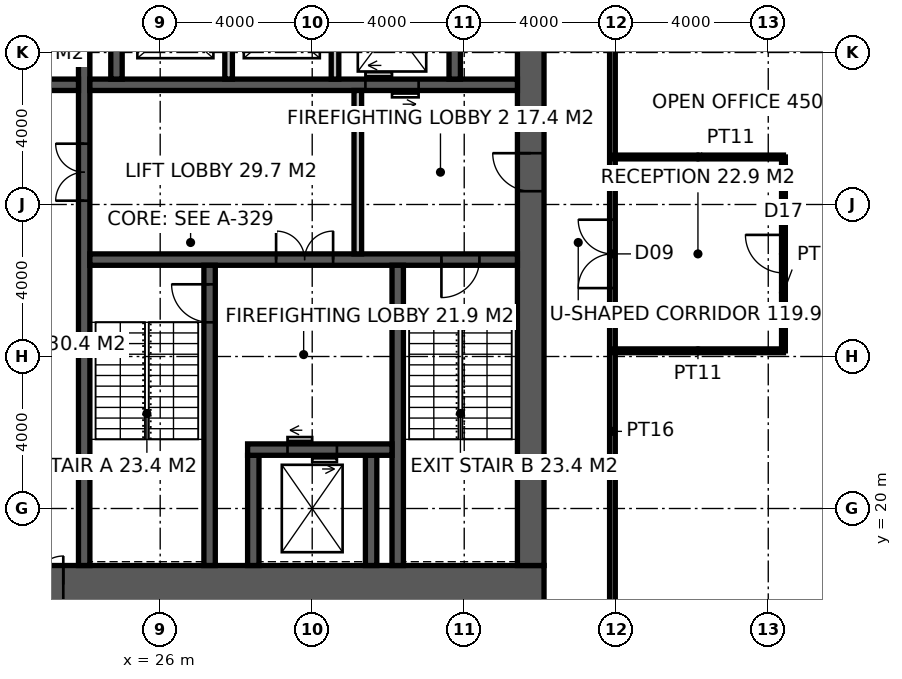
"""IFC4 building model, lengths in metres.
Left out: names, types, materials, properties, quantities, classifications, styles, units other than length and angle.
Written with IfcOpenShell. Run it as: python <this file> out.ifc"""

import sys

from ifc_helpers import new_model, si_unit, direction, frame, frame_2d, origin, place, context, subcontext, project, spatial, rectangle, extrude, element, fill, save


model = new_model("IFC4")
c1 = context("Model", 3, precision=1e-05, world=origin(), true_north=direction((0.0, 1.0)))
c2 = subcontext(c1, "Body", "Model", "MODEL_VIEW")
j1 = project(units=[si_unit("LENGTHUNIT", "METRE"), si_unit("PLANEANGLEUNIT", "RADIAN")], contexts=[c1])
p1 = place(None, origin())
s1 = spatial("IfcSite", under=j1, at=p1, CompositionType="ELEMENT")
p2 = place(p1, origin())
s2 = spatial("IfcBuilding", under=s1, at=p2, CompositionType="ELEMENT")
p3 = place(p2, frame((0.0, 0.0, 159.8)))
s3 = spatial("IfcBuildingStorey", under=s2, at=p3, CompositionType="ELEMENT", Elevation=159.8)
p4 = place(p3, frame((18.5, 18.0, -0.15), z_axis=(0.0, 0.0, 1.0), x_axis=(1.0, 0.0, 0.0)))
e1 = element("IfcWall", 1, at=p4, inside=s3, PredefinedType="SHEAR", context=c2, shape_type="SweptSolid", body=[
    extrude(rectangle(XDim=17.6, YDim=1.0, at=frame_2d((8.8, 0.0))), origin(), (0.0, 0.0, 1.0), 4.0),
])
p5 = place(p4, frame((3.45, 0.0, 0.15)))
e2 = element("IfcOpeningElement", 2, at=p5, cuts=e1, PredefinedType="OPENING", context=c2, shape_type="SweptSolid", body=[
    extrude(rectangle(XDim=1.5, YDim=2.4, at=frame_2d((0.75, 1.2))), frame((0.0, 0.51, 0.0), z_axis=(0.0, -1.0, 0.0), x_axis=(1.0, 0.0, 0.0)), (0.0, 0.0, 1.0), 1.02),
])
p6 = place(p3, frame((35.75, 18.5, -0.15), z_axis=(0.0, 0.0, 1.0), x_axis=(0.0, 1.0, 0.0)))
e3 = element("IfcWall", 3, at=p6, inside=s3, PredefinedType="SHEAR", context=c2, shape_type="SweptSolid", body=[
    extrude(rectangle(XDim=17.0, YDim=0.7, at=frame_2d((8.5, 0.0))), origin(), (0.0, 0.0, 1.0), 4.0),
])
p7 = place(p6, frame((9.85, 0.0, 0.15)))
e4 = element("IfcOpeningElement", 4, at=p7, cuts=e3, PredefinedType="OPENING", context=c2, shape_type="SweptSolid", body=[
    extrude(rectangle(XDim=1.0, YDim=2.2, at=frame_2d((0.5, 1.1))), frame((0.0, 0.36, 0.0), z_axis=(0.0, -1.0, 0.0), x_axis=(1.0, 0.0, 0.0)), (0.0, 0.0, 1.0), 0.72),
])
p8 = place(p3, frame((24.0, 18.5, -0.15), z_axis=(0.0, 0.0, 1.0), x_axis=(0.0, 1.0, 0.0)))
e5 = element("IfcWall", 5, at=p8, inside=s3, PredefinedType="SHEAR", context=c2, shape_type="SweptSolid", body=[
    extrude(rectangle(XDim=17.0, YDim=0.3, at=frame_2d((8.5, 0.0))), origin(), (0.0, 0.0, 1.0), 4.0),
])
p9 = place(p8, frame((9.6, 0.0, 0.15)))
e6 = element("IfcOpeningElement", 6, at=p9, cuts=e5, PredefinedType="OPENING", context=c2, shape_type="SweptSolid", body=[
    extrude(rectangle(XDim=1.5, YDim=2.4, at=frame_2d((0.75, 1.2))), frame((0.0, 0.16, 0.0), z_axis=(0.0, -1.0, 0.0), x_axis=(1.0, 0.0, 0.0)), (0.0, 0.0, 1.0), 0.32),
])
p10 = place(p3, frame((24.15, 26.55, -0.15), z_axis=(0.0, 0.0, 1.0), x_axis=(1.0, 0.0, 0.0)))
e7 = element("IfcWall", 7, at=p10, inside=s3, PredefinedType="SHEAR", context=c2, shape_type="SweptSolid", body=[
    extrude(rectangle(XDim=11.25, YDim=0.3, at=frame_2d((5.625, 0.0))), origin(), (0.0, 0.0, 1.0), 4.0),
])
p11 = place(p10, frame((9.25, 0.0, 0.15)))
e8 = element("IfcOpeningElement", 8, at=p11, cuts=e7, PredefinedType="OPENING", context=c2, shape_type="SweptSolid", body=[
    extrude(rectangle(XDim=1.0, YDim=2.2, at=frame_2d((0.5, 1.1))), frame((0.0, 0.16, 0.0), z_axis=(0.0, -1.0, 0.0), x_axis=(1.0, 0.0, 0.0)), (0.0, 0.0, 1.0), 0.32),
])
p12 = place(p10, frame((4.9, 0.0, 0.15)))
e9 = element("IfcOpeningElement", 9, at=p12, cuts=e7, PredefinedType="OPENING", context=c2, shape_type="SweptSolid", body=[
    extrude(rectangle(XDim=1.5, YDim=2.4, at=frame_2d((0.75, 1.2))), frame((0.0, 0.16, 0.0), z_axis=(0.0, -1.0, 0.0), x_axis=(1.0, 0.0, 0.0)), (0.0, 0.0, 1.0), 0.32),
])
p13 = place(p3, frame((27.3, 18.5, -0.15), z_axis=(0.0, 0.0, 1.0), x_axis=(0.0, 1.0, 0.0)))
e10 = element("IfcWall", 10, at=p13, inside=s3, PredefinedType="SHEAR", context=c2, shape_type="SweptSolid", body=[
    extrude(rectangle(XDim=7.9, YDim=0.3, at=frame_2d((3.95, 0.0))), origin(), (0.0, 0.0, 1.0), 4.0),
])
p14 = place(p13, frame((6.4, 0.0, 0.15)))
e11 = element("IfcOpeningElement", 11, at=p14, cuts=e10, PredefinedType="OPENING", context=c2, shape_type="SweptSolid", body=[
    extrude(rectangle(XDim=1.0, YDim=2.2, at=frame_2d((0.5, 1.1))), frame((0.0, 0.16, 0.0), z_axis=(0.0, -1.0, 0.0), x_axis=(1.0, 0.0, 0.0)), (0.0, 0.0, 1.0), 0.32),
])
p15 = place(p3, frame((32.25, 18.5, -0.15), z_axis=(0.0, 0.0, 1.0), x_axis=(0.0, 1.0, 0.0)))
e12 = element("IfcWall", 12, at=p15, inside=s3, PredefinedType="SHEAR", context=c2, shape_type="SweptSolid", body=[
    extrude(rectangle(XDim=7.9, YDim=0.3, at=frame_2d((3.95, 0.0))), origin(), (0.0, 0.0, 1.0), 4.0),
])
for number, where, z_axis, x_axis in (
    (13, (28.45, 18.5, -0.15), (0.0, 0.0, 1.0), (0.0, 1.0, 0.0)),
    (14, (31.55, 18.5, -0.15), (0.0, 0.0, 1.0), (0.0, 1.0, 0.0)),
):
    element("IfcWall", number, at=place(p3, frame(where, z_axis=z_axis, x_axis=x_axis)), inside=s3, PredefinedType="SHEAR", context=c2, shape_type="SweptSolid", body=[
        extrude(rectangle(XDim=2.9, YDim=0.3, at=frame_2d((1.45, 0.0))), origin(), (0.0, 0.0, 1.0), 4.0),
    ])
p16 = place(p3, frame((28.3, 21.55, -0.15), z_axis=(0.0, 0.0, 1.0), x_axis=(1.0, 0.0, 0.0)))
e15 = element("IfcWall", 15, at=p16, inside=s3, PredefinedType="SHEAR", context=c2, shape_type="SweptSolid", body=[
    extrude(rectangle(XDim=3.8, YDim=0.3, at=frame_2d((1.9, 0.0))), origin(), (0.0, 0.0, 1.0), 4.0),
])
p17 = place(p16, frame((1.05, 0.0, 0.15)))
e16 = element("IfcOpeningElement", 16, at=p17, cuts=e15, PredefinedType="OPENING", context=c2, shape_type="SweptSolid", body=[
    extrude(rectangle(XDim=1.3, YDim=2.4, at=frame_2d((0.65, 1.2))), frame((0.0, 0.16, 0.0), z_axis=(0.0, -1.0, 0.0), x_axis=(1.0, 0.0, 0.0)), (0.0, 0.0, 1.0), 0.32),
])
p18 = place(p3, frame((24.15, 31.15, -0.15), z_axis=(0.0, 0.0, 1.0), x_axis=(1.0, 0.0, 0.0)))
e17 = element("IfcWall", 17, at=p18, inside=s3, PredefinedType="SHEAR", context=c2, shape_type="SweptSolid", body=[
    extrude(rectangle(XDim=11.25, YDim=0.3, at=frame_2d((5.625, 0.0))), origin(), (0.0, 0.0, 1.0), 4.0),
])
p19 = place(p18, frame((7.25, 0.0, 0.15)))
e18 = element("IfcOpeningElement", 18, at=p19, cuts=e17, PredefinedType="OPENING", context=c2, shape_type="SweptSolid", body=[
    extrude(rectangle(XDim=1.4, YDim=2.4, at=frame_2d((0.7, 1.2))), frame((0.0, 0.16, 0.0), z_axis=(0.0, -1.0, 0.0), x_axis=(1.0, 0.0, 0.0)), (0.0, 0.0, 1.0), 0.32),
])
p20 = place(p3, frame((18.5, 31.15, -0.15), z_axis=(0.0, 0.0, 1.0), x_axis=(1.0, 0.0, 0.0)))
e19 = element("IfcWall", 19, at=p20, inside=s3, PredefinedType="SHEAR", context=c2, shape_type="SweptSolid", body=[
    extrude(rectangle(XDim=5.35, YDim=0.3, at=frame_2d((2.675, 0.0))), origin(), (0.0, 0.0, 1.0), 4.0),
])
p21 = place(p20, frame((3.4, 0.0, 0.15)))
e20 = element("IfcOpeningElement", 20, at=p21, cuts=e19, PredefinedType="OPENING", context=c2, shape_type="SweptSolid", body=[
    extrude(rectangle(XDim=1.0, YDim=2.2, at=frame_2d((0.5, 1.1))), frame((0.0, 0.16, 0.0), z_axis=(0.0, -1.0, 0.0), x_axis=(1.0, 0.0, 0.0)), (0.0, 0.0, 1.0), 0.32),
])
for number, where, z_axis, x_axis in (
    (21, (24.85, 31.3, -0.15), (0.0, 0.0, 1.0), (0.0, 1.0, 0.0)),
    (22, (33.75, 31.3, -0.15), (0.0, 0.0, 1.0), (0.0, 1.0, 0.0)),
):
    element("IfcWall", number, at=place(p3, frame(where, z_axis=z_axis, x_axis=x_axis)), inside=s3, PredefinedType="SHEAR", context=c2, shape_type="SweptSolid", body=[
        extrude(rectangle(XDim=4.2, YDim=0.3, at=frame_2d((2.1, 0.0))), origin(), (0.0, 0.0, 1.0), 4.0),
    ])
for number, where, z_axis, x_axis in (
    (23, (27.8, 31.3, -0.15), (0.0, 0.0, 1.0), (0.0, 1.0, 0.0)),
    (24, (30.6, 31.3, -0.15), (0.0, 0.0, 1.0), (0.0, 1.0, 0.0)),
):
    element("IfcWall", number, at=place(p3, frame(where, z_axis=z_axis, x_axis=x_axis)), inside=s3, PredefinedType="SOLIDWALL", context=c2, shape_type="SweptSolid", body=[
        extrude(rectangle(XDim=2.8, YDim=0.2, at=frame_2d((1.4, 0.0))), origin(), (0.0, 0.0, 1.0), 4.0),
    ])
p22 = place(p3, frame((31.2, 26.7, 0.0), z_axis=(0.0, 0.0, 1.0), x_axis=(0.0, 1.0, 0.0)))
e25 = element("IfcWall", 25, at=p22, inside=s3, PredefinedType="SOLIDWALL", context=c2, shape_type="SweptSolid", body=[
    extrude(rectangle(XDim=4.3, YDim=0.2, at=frame_2d((2.15, 0.0))), origin(), (0.0, 0.0, 1.0), 3.85),
])
p23 = place(p3, frame((37.9, 15.025, 0.0), z_axis=(0.0, 0.0, 1.0), x_axis=(0.0, 1.0, 0.0)))
e26 = element("IfcWall", 26, at=p23, inside=s3, PredefinedType="PARTITIONING", context=c2, shape_type="SweptSolid", body=[
    extrude(rectangle(XDim=23.35, YDim=0.15, at=frame_2d((11.675, 0.0))), origin(), (0.0, 0.0, 1.0), 2.95),
])
p24 = place(p23, frame((10.775, 0.0, 0.0)))
e27 = element("IfcOpeningElement", 27, at=p24, cuts=e26, PredefinedType="OPENING", context=c2, shape_type="SweptSolid", body=[
    extrude(rectangle(XDim=1.8, YDim=2.4, at=frame_2d((0.9, 1.2))), frame((0.0, 0.085, 0.0), z_axis=(0.0, -1.0, 0.0), x_axis=(1.0, 0.0, 0.0)), (0.0, 0.0, 1.0), 0.17),
])
p25 = place(p3, frame((37.9, 24.15, 0.0), z_axis=(0.0, 0.0, 1.0), x_axis=(1.0, 0.0, 0.0)))
e28 = element("IfcWall", 28, at=p25, inside=s3, PredefinedType="PARTITIONING", context=c2, shape_type="SweptSolid", body=[
    extrude(rectangle(XDim=4.5, YDim=0.1, at=frame_2d((2.25, 0.0))), origin(), (0.0, 0.0, 1.0), 2.95),
])
p26 = place(p3, frame((42.4, 24.15, 0.0), z_axis=(0.0, 0.0, 1.0), x_axis=(0.0, 1.0, 0.0)))
e29 = element("IfcWall", 29, at=p26, inside=s3, PredefinedType="PARTITIONING", context=c2, shape_type="SweptSolid", body=[
    extrude(rectangle(XDim=5.1, YDim=0.1, at=frame_2d((2.55, 0.0))), origin(), (0.0, 0.0, 1.0), 3.85),
])
p27 = place(p26, frame((2.05, 0.0, 0.0)))
e30 = element("IfcOpeningElement", 30, at=p27, cuts=e29, PredefinedType="OPENING", context=c2, shape_type="SweptSolid", body=[
    extrude(rectangle(XDim=1.0, YDim=2.2, at=frame_2d((0.5, 1.1))), frame((0.0, 0.06, 0.0), z_axis=(0.0, -1.0, 0.0), x_axis=(1.0, 0.0, 0.0)), (0.0, 0.0, 1.0), 0.12),
])
p28 = place(p3, frame((42.4, 29.25, 0.0), z_axis=(0.0, 0.0, 1.0), x_axis=(-1.0, 0.0, 0.0)))
e31 = element("IfcWall", 31, at=p28, inside=s3, PredefinedType="PARTITIONING", context=c2, shape_type="SweptSolid", body=[
    extrude(rectangle(XDim=4.5, YDim=0.1, at=frame_2d((2.25, 0.0))), origin(), (0.0, 0.0, 1.0), 3.85),
])
p29 = place(p14, origin())
e32 = element("IfcDoor", 32, at=p29, inside=s3, OperationType="SINGLE_SWING_RIGHT", PredefinedType="DOOR", context=c2, shape_type="SweptSolid", body=[
    extrude(rectangle(XDim=1.0, YDim=2.2, at=frame_2d((0.5, 1.1))), frame((0.0, 0.025, 0.0), z_axis=(0.0, -1.0, 0.0), x_axis=(1.0, 0.0, 0.0)), (0.0, 0.0, 1.0), 0.05),
])
fill(e11, e32)
p30 = place(p11, frame((1.0, 0.0, 0.0), z_axis=(0.0, 0.0, 1.0), x_axis=(-1.0, 0.0, 0.0)))
e33 = element("IfcDoor", 33, at=p30, inside=s3, OperationType="SINGLE_SWING_RIGHT", PredefinedType="DOOR", context=c2, shape_type="SweptSolid", body=[
    extrude(rectangle(XDim=1.0, YDim=2.2, at=frame_2d((0.5, 1.1))), frame((0.0, 0.025, 0.0), z_axis=(0.0, -1.0, 0.0), x_axis=(1.0, 0.0, 0.0)), (0.0, 0.0, 1.0), 0.05),
])
fill(e8, e33)
p31 = place(p7, origin())
e34 = element("IfcDoor", 34, at=p31, inside=s3, OperationType="SINGLE_SWING_RIGHT", PredefinedType="DOOR", context=c2, shape_type="SweptSolid", body=[
    extrude(rectangle(XDim=1.0, YDim=2.2, at=frame_2d((0.5, 1.1))), frame((0.0, 0.025, 0.0), z_axis=(0.0, -1.0, 0.0), x_axis=(1.0, 0.0, 0.0)), (0.0, 0.0, 1.0), 0.05),
])
fill(e4, e34)
p32 = place(p12, origin())
e35 = element("IfcDoor", 35, at=p32, inside=s3, OperationType="DOUBLE_DOOR_DOUBLE_SWING", PredefinedType="DOOR", context=c2, shape_type="SweptSolid", body=[
    extrude(rectangle(XDim=1.5, YDim=2.4, at=frame_2d((0.75, 1.2))), frame((0.0, 0.025, 0.0), z_axis=(0.0, -1.0, 0.0), x_axis=(1.0, 0.0, 0.0)), (0.0, 0.0, 1.0), 0.05),
])
fill(e9, e35)
p33 = place(p9, origin())
e36 = element("IfcDoor", 36, at=p33, inside=s3, OperationType="DOUBLE_DOOR_DOUBLE_SWING", PredefinedType="DOOR", context=c2, shape_type="SweptSolid", body=[
    extrude(rectangle(XDim=1.5, YDim=2.4, at=frame_2d((0.75, 1.2))), frame((0.0, 0.025, 0.0), z_axis=(0.0, -1.0, 0.0), x_axis=(1.0, 0.0, 0.0)), (0.0, 0.0, 1.0), 0.05),
])
fill(e6, e36)
p34 = place(p5, origin())
e37 = element("IfcDoor", 37, at=p34, inside=s3, OperationType="DOUBLE_DOOR_DOUBLE_SWING", PredefinedType="DOOR", context=c2, shape_type="SweptSolid", body=[
    extrude(rectangle(XDim=1.5, YDim=2.4, at=frame_2d((0.75, 1.2))), frame((0.0, 0.025, 0.0), z_axis=(0.0, -1.0, 0.0), x_axis=(1.0, 0.0, 0.0)), (0.0, 0.0, 1.0), 0.05),
])
fill(e2, e37)
p35 = place(p24, origin())
e38 = element("IfcDoor", 38, at=p35, inside=s3, OperationType="DOUBLE_DOOR_DOUBLE_SWING", PredefinedType="DOOR", context=c2, shape_type="SweptSolid", body=[
    extrude(rectangle(XDim=1.8, YDim=2.4, at=frame_2d((0.9, 1.2))), frame((0.0, 0.025, 0.0), z_axis=(0.0, -1.0, 0.0), x_axis=(1.0, 0.0, 0.0)), (0.0, 0.0, 1.0), 0.05),
])
fill(e27, e38)
p36 = place(p27, origin())
e39 = element("IfcDoor", 39, at=p36, inside=s3, OperationType="SINGLE_SWING_RIGHT", PredefinedType="DOOR", context=c2, shape_type="SweptSolid", body=[
    extrude(rectangle(XDim=1.0, YDim=2.2, at=frame_2d((0.5, 1.1))), frame((0.0, 0.025, 0.0), z_axis=(0.0, -1.0, 0.0), x_axis=(1.0, 0.0, 0.0)), (0.0, 0.0, 1.0), 0.05),
])
fill(e30, e39)
p37 = place(p17, origin())
e40 = element("IfcDoor", 40, at=p37, inside=s3, OperationType="DOUBLE_DOOR_SLIDING", PredefinedType="DOOR", context=c2, shape_type="SweptSolid", body=[
    extrude(rectangle(XDim=1.3, YDim=2.4, at=frame_2d((0.65, 1.2))), frame((0.0, 0.025, 0.0), z_axis=(0.0, -1.0, 0.0), x_axis=(1.0, 0.0, 0.0)), (0.0, 0.0, 1.0), 0.05),
])
fill(e16, e40)
p38 = place(p19, origin())
e41 = element("IfcDoor", 41, at=p38, inside=s3, OperationType="DOUBLE_DOOR_SLIDING", PredefinedType="DOOR", context=c2, shape_type="SweptSolid", body=[
    extrude(rectangle(XDim=1.4, YDim=2.4, at=frame_2d((0.7, 1.2))), frame((0.0, 0.025, 0.0), z_axis=(0.0, -1.0, 0.0), x_axis=(1.0, 0.0, 0.0)), (0.0, 0.0, 1.0), 0.05),
])
fill(e18, e41)
save(model, sys.argv[1])
